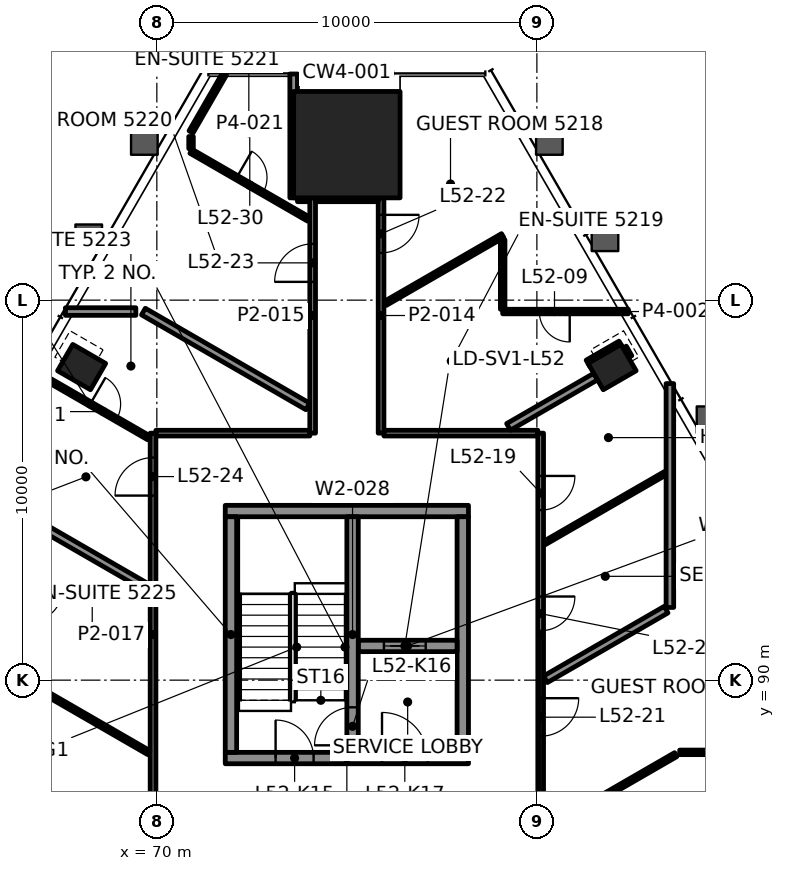
"""IFC4 building model, lengths in metres.
Left out: names, types, materials, properties, quantities, classifications, styles, units other than length and angle.
Written with IfcOpenShell. Run it as: python <this file> out.ifc"""

import sys

from ifc_helpers import new_model, si_unit, direction, frame, frame_2d, origin, origin_2d, place, context, subcontext, project, spatial, rectangle, hollow_rectangle, extrude, element, fill, save


model = new_model("IFC4")
c1 = context("Model", 3, precision=1e-05, world=origin(), true_north=direction((0.0, 1.0)))
c2 = subcontext(c1, "Body", "Model", "MODEL_VIEW")
j1 = project(units=[si_unit("LENGTHUNIT", "METRE"), si_unit("PLANEANGLEUNIT", "RADIAN")], contexts=[c1])
p1 = place(None, origin())
s1 = spatial("IfcSite", under=j1, at=p1, CompositionType="ELEMENT")
p2 = place(p1, origin())
s2 = spatial("IfcBuilding", under=s1, at=p2, CompositionType="ELEMENT")
p3 = place(p2, frame((0.0, 0.0, 222.1)))
s3 = spatial("IfcBuildingStorey", under=s2, at=p3, CompositionType="ELEMENT", Elevation=222.1)
p4 = place(p3, frame((75.0, 104.092, 0.0), z_axis=(0.0, 0.0, 1.0), x_axis=(-1.0, 0.0, 0.0)))
e1 = element("IfcColumn", 1, at=p4, inside=s3, PredefinedType="COLUMN", context=c2, shape_type="SweptSolid", body=[
    extrude(rectangle(XDim=2.8, YDim=2.8, at=origin_2d()), origin(), (0.0, 0.0, 1.0), 3.9),
])
for number, where, z_axis, x_axis in (
    (2, (81.979, 98.238, -0.0), (0.0, 0.0, 1.0), (-0.5, 0.866, 0.0)),
    (3, (68.021, 98.238, -0.0), (0.0, 0.0, 1.0), (-0.5, -0.866, 0.0)),
):
    element("IfcColumn", number, at=place(p3, frame(where, z_axis=z_axis, x_axis=x_axis)), inside=s3, PredefinedType="COLUMN", context=c2, shape_type="SweptSolid", body=[
        extrude(hollow_rectangle(XDim=0.8, YDim=1.0, WallThickness=0.05, at=origin_2d()), origin(), (0.0, 0.0, 1.0), 3.9),
    ])
p5 = place(p3, frame((71.8, 87.95, 0.0), z_axis=(0.0, 0.0, 1.0), x_axis=(1.0, 0.0, 0.0)))
e4 = element("IfcWall", 4, at=p5, inside=s3, PredefinedType="SHEAR", context=c2, shape_type="SweptSolid", body=[
    extrude(rectangle(XDim=6.4, YDim=0.3, at=frame_2d((3.2, 0.0))), origin(), (0.0, 0.0, 1.0), 3.7),
])
p6 = place(p5, frame((1.325, 0.0, 0.0)))
e5 = element("IfcOpeningElement", 5, at=p6, cuts=e4, PredefinedType="OPENING", context=c2, shape_type="SweptSolid", body=[
    extrude(rectangle(XDim=1.0, YDim=2.1, at=frame_2d((0.5, 1.05))), frame((0.0, 0.16, 0.0), z_axis=(0.0, -1.0, 0.0), x_axis=(1.0, 0.0, 0.0)), (0.0, 0.0, 1.0), 0.32),
])
p7 = place(p5, frame((4.125, 0.0, 0.0)))
e6 = element("IfcOpeningElement", 6, at=p7, cuts=e4, PredefinedType="OPENING", context=c2, shape_type="SweptSolid", body=[
    extrude(rectangle(XDim=1.2, YDim=2.1, at=frame_2d((0.6, 1.05))), frame((0.0, 0.16, 0.0), z_axis=(0.0, -1.0, 0.0), x_axis=(1.0, 0.0, 0.0)), (0.0, 0.0, 1.0), 0.32),
])
p8 = place(p3, frame((71.8, 94.45, 0.0), z_axis=(0.0, 0.0, 1.0), x_axis=(1.0, 0.0, 0.0)))
e7 = element("IfcWall", 7, at=p8, inside=s3, PredefinedType="SHEAR", context=c2, shape_type="SweptSolid", body=[
    extrude(rectangle(XDim=6.4, YDim=0.3, at=frame_2d((3.2, 0.0))), origin(), (0.0, 0.0, 1.0), 3.7),
])
for number, where, z_axis, x_axis in (
    (8, (71.95, 88.1, 0.0), (0.0, 0.0, 1.0), (0.0, 1.0, 0.0)),
    (9, (78.05, 88.1, 0.0), (0.0, 0.0, 1.0), (0.0, 1.0, 0.0)),
):
    element("IfcWall", number, at=place(p3, frame(where, z_axis=z_axis, x_axis=x_axis)), inside=s3, PredefinedType="SHEAR", context=c2, shape_type="SweptSolid", body=[
        extrude(rectangle(XDim=6.2, YDim=0.3, at=frame_2d((3.1, 0.0))), origin(), (0.0, 0.0, 1.0), 3.7),
    ])
p9 = place(p3, frame((75.3, 90.9, 0.0), z_axis=(0.0, 0.0, 1.0), x_axis=(1.0, 0.0, 0.0)))
e10 = element("IfcWall", 10, at=p9, inside=s3, PredefinedType="SHEAR", context=c2, shape_type="SweptSolid", body=[
    extrude(rectangle(XDim=2.6, YDim=0.3, at=frame_2d((1.3, 0.0))), origin(), (0.0, 0.0, 1.0), 3.7),
])
p10 = place(p9, frame((0.675, 0.0, 0.0)))
e11 = element("IfcOpeningElement", 11, at=p10, cuts=e10, PredefinedType="OPENING", context=c2, shape_type="SweptSolid", body=[
    extrude(rectangle(XDim=1.1, YDim=2.1, at=frame_2d((0.55, 1.05))), frame((0.0, 0.16, 0.0), z_axis=(0.0, -1.0, 0.0), x_axis=(1.0, 0.0, 0.0)), (0.0, 0.0, 1.0), 0.32),
])
p11 = place(p3, frame((75.15, 88.1, 0.0), z_axis=(0.0, 0.0, 1.0), x_axis=(0.0, 1.0, 0.0)))
e12 = element("IfcWall", 12, at=p11, inside=s3, PredefinedType="SHEAR", context=c2, shape_type="SweptSolid", body=[
    extrude(rectangle(XDim=6.2, YDim=0.3, at=frame_2d((3.1, 0.0))), origin(), (0.0, 0.0, 1.0), 3.7),
])
p12 = place(p11, frame((0.185, 0.0, 0.0)))
e13 = element("IfcOpeningElement", 13, at=p12, cuts=e12, PredefinedType="OPENING", context=c2, shape_type="SweptSolid", body=[
    extrude(rectangle(XDim=1.0, YDim=2.1, at=frame_2d((0.5, 1.05))), frame((0.0, 0.16, 0.0), z_axis=(0.0, -1.0, 0.0), x_axis=(1.0, 0.0, 0.0)), (0.0, 0.0, 1.0), 0.32),
])
p13 = place(p3, frame((88.941, 88.1, 0.0), z_axis=(0.0, 0.0, 1.0), x_axis=(-1.0, 0.0, 0.0)))
e14 = element("IfcWall", 14, at=p13, inside=s3, PredefinedType="PARTITIONING", context=c2, shape_type="SweptSolid", body=[
    extrude(rectangle(XDim=5.183, YDim=0.12, at=frame_2d((2.592, 0.0))), origin(), (0.0, 0.0, 1.0), 3.022),
])
p14 = place(p13, frame((2.399, 0.0, 0.0)))
e15 = element("IfcOpeningElement", 15, at=p14, cuts=e14, PredefinedType="OPENING", context=c2, shape_type="SweptSolid", body=[
    extrude(rectangle(XDim=0.8, YDim=2.1, at=frame_2d((0.4, 1.05))), frame((0.0, 0.07, 0.0), z_axis=(0.0, -1.0, 0.0), x_axis=(1.0, 0.0, 0.0)), (0.0, 0.0, 1.0), 0.14),
])
for number, where, z_axis, x_axis in (
    (16, (69.976, 96.5, 0.0), (0.0, 0.0, 1.0), (1.0, 0.0, 0.0)),
    (17, (75.975, 96.5, 0.0), (0.0, 0.0, 1.0), (1.0, 0.0, 0.0)),
):
    element("IfcWall", number, at=place(p3, frame(where, z_axis=z_axis, x_axis=x_axis)), inside=s3, PredefinedType="PARTITIONING", context=c2, shape_type="SweptSolid", body=[
        extrude(rectangle(XDim=4.049, YDim=0.15, at=frame_2d((2.025, 0.0))), origin(), (0.0, 0.0, 1.0), 3.1),
    ])
p15 = place(p3, frame((67.594, 99.7, 0.0), z_axis=(0.0, 0.0, 1.0), x_axis=(1.0, 0.0, 0.0)))
e18 = element("IfcWall", 18, at=p15, inside=s3, PredefinedType="PARTITIONING", context=c2, shape_type="SweptSolid", body=[
    extrude(rectangle(XDim=1.853, YDim=0.2, at=frame_2d((0.927, 0.0))), origin(), (0.0, 0.0, 1.0), 3.1),
])
p16 = place(p3, frame((82.406, 99.7, 0.0), z_axis=(0.0, 0.0, 1.0), x_axis=(-1.0, 0.0, 0.0)))
e19 = element("IfcWall", 19, at=p16, inside=s3, PredefinedType="PARTITIONING", context=c2, shape_type="SweptSolid", body=[
    extrude(rectangle(XDim=3.305, YDim=0.12, at=frame_2d((1.653, 0.0))), origin(), (0.0, 0.0, 1.0), 3.1),
])
p17 = place(p16, frame((1.542, 0.0, 0.0)))
e20 = element("IfcOpeningElement", 20, at=p17, cuts=e19, PredefinedType="OPENING", context=c2, shape_type="SweptSolid", body=[
    extrude(rectangle(XDim=0.8, YDim=2.1, at=frame_2d((0.4, 1.05))), frame((0.0, 0.07, 0.0), z_axis=(0.0, -1.0, 0.0), x_axis=(1.0, 0.0, 0.0)), (0.0, 0.0, 1.0), 0.14),
])
p18 = place(p3, frame((73.7, 102.691, 0.0), z_axis=(0.0, 0.0, 1.0), x_axis=(1.0, 0.0, 0.0)))
e21 = element("IfcWall", 21, at=p18, inside=s3, PredefinedType="PARTITIONING", context=c2, shape_type="SweptSolid", body=[
    extrude(rectangle(XDim=0.324, YDim=0.2, at=frame_2d((0.162, 0.0))), origin(), (0.0, 0.0, 1.0), 3.1),
])
p19 = place(p3, frame((84.115, 85.065, 0.0), z_axis=(0.0, 0.0, 1.0), x_axis=(0.866027152591, 0.499996970966, 0.0)))
e22 = element("IfcWall", 22, at=p19, inside=s3, PredefinedType="PARTITIONING", context=c2, shape_type="SweptSolid", body=[
    extrude(rectangle(XDim=5.697, YDim=0.2, at=frame_2d((2.848, 0.0))), origin(), (0.0, 0.0, 1.0), 3.022),
])
p20 = place(p3, frame((80.209, 86.052, 0.0), z_axis=(0.0, 0.0, 1.0), x_axis=(0.866032250876, 0.499988140302, 0.0)))
e23 = element("IfcWall", 23, at=p20, inside=s3, PredefinedType="PARTITIONING", context=c2, shape_type="SweptSolid", body=[
    extrude(rectangle(XDim=3.977, YDim=0.12, at=frame_2d((1.989, 0.0))), origin(), (0.0, 0.0, 1.0), 3.1),
])
p21 = place(p3, frame((80.227, 90.023, 0.0), z_axis=(0.0, 0.0, 1.0), x_axis=(0.866020252061, 0.500008922941, 0.0)))
e24 = element("IfcWall", 24, at=p21, inside=s3, PredefinedType="PARTITIONING", context=c2, shape_type="SweptSolid", body=[
    extrude(rectangle(XDim=3.664, YDim=0.2, at=frame_2d((1.832, 0.0))), origin(), (0.0, 0.0, 1.0), 3.1),
])
p22 = place(p3, frame((80.201, 93.61, 0.0), z_axis=(0.0, 0.0, 1.0), x_axis=(0.866020252061, 0.500008922941, 0.0)))
e25 = element("IfcWall", 25, at=p22, inside=s3, PredefinedType="PARTITIONING", context=c2, shape_type="SweptSolid", body=[
    extrude(rectangle(XDim=3.664, YDim=0.1, at=frame_2d((1.832, 0.0))), origin(), (0.0, 0.0, 1.0), 3.1),
])
p23 = place(p3, frame((79.255, 96.665, 0.0), z_axis=(0.0, 0.0, 1.0), x_axis=(0.866048852527, 0.499959383386, 0.0)))
e26 = element("IfcWall", 26, at=p23, inside=s3, PredefinedType="PARTITIONING", context=c2, shape_type="SweptSolid", body=[
    extrude(rectangle(XDim=2.646, YDim=0.2, at=frame_2d((1.323, 0.0))), origin(), (0.0, 0.0, 1.0), 3.1),
])
p24 = place(p3, frame((81.346, 98.334, 0.0), z_axis=(0.0, 0.0, 1.0), x_axis=(0.866010750942, 0.50002537861, 0.0)))
e27 = element("IfcWall", 27, at=p24, inside=s3, PredefinedType="PARTITIONING", context=c2, shape_type="SweptSolid", body=[
    extrude(rectangle(XDim=1.0, YDim=0.2, at=frame_2d((0.5, 0.0))), origin(), (0.0, 0.0, 1.0), 3.1),
])
p25 = place(p3, frame((76.01, 99.914, 0.0), z_axis=(0.0, 0.0, 1.0), x_axis=(0.866028357664, 0.499994883695, 0.0)))
e28 = element("IfcWall", 28, at=p25, inside=s3, PredefinedType="PARTITIONING", context=c2, shape_type="SweptSolid", body=[
    extrude(rectangle(XDim=3.568, YDim=0.12, at=frame_2d((1.784, 0.0))), origin(), (0.0, 0.0, 1.0), 3.1),
])
p26 = place(p3, frame((70.9, 104.426, 0.0), z_axis=(0.0, 0.0, 1.0), x_axis=(0.500014360914, 0.866017112348, 0.0)))
e29 = element("IfcWall", 29, at=p26, inside=s3, PredefinedType="PARTITIONING", context=c2, shape_type="SweptSolid", body=[
    extrude(rectangle(XDim=1.762, YDim=0.12, at=frame_2d((0.881, 0.0))), origin(), (0.0, 0.0, 1.0), 3.1),
])
p27 = place(p3, frame((83.5, 91.913, 0.0), z_axis=(0.0, 0.0, 1.0), x_axis=(0.0, 1.0, 0.0)))
e30 = element("IfcWall", 30, at=p27, inside=s3, PredefinedType="PARTITIONING", context=c2, shape_type="SweptSolid", body=[
    extrude(rectangle(XDim=5.892, YDim=0.2, at=frame_2d((2.946, 0.0))), origin(), (0.0, 0.0, 1.0), 3.022),
])
p28 = place(p3, frame((80.1, 96.5, 0.0), z_axis=(0.0, 0.0, 1.0), x_axis=(0.0, -1.0, 0.0)))
e31 = element("IfcWall", 31, at=p28, inside=s3, PredefinedType="PARTITIONING", context=c2, shape_type="SweptSolid", body=[
    extrude(rectangle(XDim=10.6, YDim=0.15, at=frame_2d((5.3, 0.0))), origin(), (0.0, 0.0, 1.0), 3.1),
])
p29 = place(p28, frame((1.125, 0.0, 0.0)))
e32 = element("IfcOpeningElement", 32, at=p29, cuts=e31, PredefinedType="OPENING", context=c2, shape_type="SweptSolid", body=[
    extrude(rectangle(XDim=0.9, YDim=2.1, at=frame_2d((0.45, 1.05))), frame((0.0, 0.085, 0.0), z_axis=(0.0, -1.0, 0.0), x_axis=(1.0, 0.0, 0.0)), (0.0, 0.0, 1.0), 0.17),
])
p30 = place(p28, frame((4.299, 0.0, 0.0)))
e33 = element("IfcOpeningElement", 33, at=p30, cuts=e31, PredefinedType="OPENING", context=c2, shape_type="SweptSolid", body=[
    extrude(rectangle(XDim=0.9, YDim=2.1, at=frame_2d((0.45, 1.05))), frame((0.0, 0.085, 0.0), z_axis=(0.0, -1.0, 0.0), x_axis=(1.0, 0.0, 0.0)), (0.0, 0.0, 1.0), 0.17),
])
p31 = place(p28, frame((6.974, 0.0, 0.0)))
e34 = element("IfcOpeningElement", 34, at=p31, cuts=e31, PredefinedType="OPENING", context=c2, shape_type="SweptSolid", body=[
    extrude(rectangle(XDim=1.0, YDim=2.1, at=frame_2d((0.5, 1.05))), frame((0.0, 0.085, 0.0), z_axis=(0.0, -1.0, 0.0), x_axis=(1.0, 0.0, 0.0)), (0.0, 0.0, 1.0), 0.17),
])
p32 = place(p3, frame((79.1, 99.76, 0.0), z_axis=(0.0, 0.0, 1.0), x_axis=(0.0, 1.0, 0.0)))
e35 = element("IfcWall", 35, at=p32, inside=s3, PredefinedType="PARTITIONING", context=c2, shape_type="SweptSolid", body=[
    extrude(rectangle(XDim=1.829, YDim=0.12, at=frame_2d((0.915, 0.0))), origin(), (0.0, 0.0, 1.0), 3.1),
])
p33 = place(p3, frame((75.9, 102.691, 0.0), z_axis=(0.0, 0.0, 1.0), x_axis=(0.0, -1.0, 0.0)))
e36 = element("IfcWall", 36, at=p33, inside=s3, PredefinedType="PARTITIONING", context=c2, shape_type="SweptSolid", body=[
    extrude(rectangle(XDim=6.191, YDim=0.15, at=frame_2d((3.095, 0.0))), origin(), (0.0, 0.0, 1.0), 3.1),
])
p34 = place(p33, frame((0.447, 0.0, 0.0)))
e37 = element("IfcOpeningElement", 37, at=p34, cuts=e36, PredefinedType="OPENING", context=c2, shape_type="SweptSolid", body=[
    extrude(rectangle(XDim=1.0, YDim=2.1, at=frame_2d((0.5, 1.05))), frame((0.0, 0.085, 0.0), z_axis=(0.0, -1.0, 0.0), x_axis=(1.0, 0.0, 0.0)), (0.0, 0.0, 1.0), 0.17),
])
p35 = place(p3, frame((74.1, 96.5, 0.0), z_axis=(0.0, 0.0, 1.0), x_axis=(0.0, 1.0, 0.0)))
e38 = element("IfcWall", 38, at=p35, inside=s3, PredefinedType="PARTITIONING", context=c2, shape_type="SweptSolid", body=[
    extrude(rectangle(XDim=6.191, YDim=0.15, at=frame_2d((3.096, 0.0))), origin(), (0.0, 0.0, 1.0), 3.1),
])
p36 = place(p35, frame((3.981, 0.0, 0.0)))
e39 = element("IfcOpeningElement", 39, at=p36, cuts=e38, PredefinedType="OPENING", context=c2, shape_type="SweptSolid", body=[
    extrude(rectangle(XDim=1.0, YDim=2.1, at=frame_2d((0.5, 1.05))), frame((0.0, 0.085, 0.0), z_axis=(0.0, -1.0, 0.0), x_axis=(1.0, 0.0, 0.0)), (0.0, 0.0, 1.0), 0.17),
])
p37 = place(p3, frame((73.6, 102.692, 0.0), z_axis=(0.0, 0.0, 1.0), x_axis=(0.0, 1.0, 0.0)))
e40 = element("IfcWall", 40, at=p37, inside=s3, PredefinedType="PARTITIONING", context=c2, shape_type="SweptSolid", body=[
    extrude(rectangle(XDim=3.26, YDim=0.2, at=frame_2d((1.63, 0.0))), origin(), (0.0, 0.0, 1.0), 3.1),
])
p38 = place(p3, frame((70.9, 103.986, 0.0), z_axis=(0.0, 0.0, 1.0), x_axis=(0.0, 1.0, 0.0)))
e41 = element("IfcWall", 41, at=p38, inside=s3, PredefinedType="PARTITIONING", context=c2, shape_type="SweptSolid", body=[
    extrude(rectangle(XDim=0.319, YDim=0.12, at=frame_2d((0.16, 0.0))), origin(), (0.0, 0.0, 1.0), 3.1),
])
p39 = place(p3, frame((69.9, 85.9, 0.0), z_axis=(0.0, 0.0, 1.0), x_axis=(0.0, 1.0, 0.0)))
e42 = element("IfcWall", 42, at=p39, inside=s3, PredefinedType="PARTITIONING", context=c2, shape_type="SweptSolid", body=[
    extrude(rectangle(XDim=10.599, YDim=0.15, at=frame_2d((5.3, 0.0))), origin(), (0.0, 0.0, 1.0), 3.1),
])
p40 = place(p39, frame((8.956, 0.0, 0.0)))
e43 = element("IfcOpeningElement", 43, at=p40, cuts=e42, PredefinedType="OPENING", context=c2, shape_type="SweptSolid", body=[
    extrude(rectangle(XDim=1.0, YDim=2.1, at=frame_2d((0.5, 1.05))), frame((0.0, 0.085, 0.0), z_axis=(0.0, -1.0, 0.0), x_axis=(1.0, 0.0, 0.0)), (0.0, 0.0, 1.0), 0.17),
])
p41 = place(p3, frame((82.412, 98.488, 0.0), z_axis=(0.0, 0.0, 1.0), x_axis=(-0.499941024108, 0.866059450854, 0.0)))
e44 = element("IfcWall", 44, at=p41, inside=s3, PredefinedType="PARTITIONING", context=c2, shape_type="SweptSolid", body=[
    extrude(rectangle(XDim=0.29, YDim=0.2, at=frame_2d((0.145, 0.0))), origin(), (0.0, 0.0, 1.0), 3.1),
])
p42 = place(p3, frame((70.9, 103.917, 0.0), z_axis=(0.0, 0.0, 1.0), x_axis=(0.866028357664, -0.499994883695, 0.0)))
e45 = element("IfcWall", 45, at=p42, inside=s3, PredefinedType="PARTITIONING", context=c2, shape_type="SweptSolid", body=[
    extrude(rectangle(XDim=3.568, YDim=0.12, at=frame_2d((1.784, 0.0))), origin(), (0.0, 0.0, 1.0), 3.1),
])
p43 = place(p42, frame((1.384, 0.0, 0.0)))
e46 = element("IfcOpeningElement", 46, at=p43, cuts=e45, PredefinedType="OPENING", context=c2, shape_type="SweptSolid", body=[
    extrude(rectangle(XDim=0.8, YDim=2.1, at=frame_2d((0.4, 1.05))), frame((0.0, 0.07, 0.0), z_axis=(0.0, -1.0, 0.0), x_axis=(1.0, 0.0, 0.0)), (0.0, 0.0, 1.0), 0.14),
])
p44 = place(p3, frame((73.973, 97.202, 0.0), z_axis=(0.0, 0.0, 1.0), x_axis=(-0.866035818332, 0.499981961041, 0.0)))
e47 = element("IfcWall", 47, at=p44, inside=s3, PredefinedType="PARTITIONING", context=c2, shape_type="SweptSolid", body=[
    extrude(rectangle(XDim=4.995, YDim=0.2, at=frame_2d((2.498, 0.0))), origin(), (0.0, 0.0, 1.0), 3.1),
])
p45 = place(p3, frame((66.704, 98.158, 0.0), z_axis=(0.0, 0.0, 1.0), x_axis=(0.866021313335, -0.500007084799, 0.0)))
e48 = element("IfcWall", 48, at=p45, inside=s3, PredefinedType="PARTITIONING", context=c2, shape_type="SweptSolid", body=[
    extrude(rectangle(XDim=3.564, YDim=0.12, at=frame_2d((1.782, 0.0))), origin(), (0.0, 0.0, 1.0), 3.022),
])
p46 = place(p45, frame((1.782, 0.0, 0.0)))
e49 = element("IfcOpeningElement", 49, at=p46, cuts=e48, PredefinedType="OPENING", context=c2, shape_type="SweptSolid", body=[
    extrude(rectangle(XDim=0.8, YDim=2.1, at=frame_2d((0.4, 1.05))), frame((0.0, 0.07, 0.0), z_axis=(0.0, -1.0, 0.0), x_axis=(1.0, 0.0, 0.0)), (0.0, 0.0, 1.0), 0.14),
])
p47 = place(p3, frame((69.773, 92.424, 0.0), z_axis=(0.0, 0.0, 1.0), x_axis=(-0.866031780221, 0.499988955525, 0.0)))
e50 = element("IfcWall", 50, at=p47, inside=s3, PredefinedType="PARTITIONING", context=c2, shape_type="SweptSolid", body=[
    extrude(rectangle(XDim=5.524, YDim=0.2, at=frame_2d((2.762, 0.0))), origin(), (0.0, 0.0, 1.0), 3.022),
])
p48 = place(p3, frame((69.79, 88.092, 0.0), z_axis=(0.0, 0.0, 1.0), x_axis=(-0.866045006744, 0.49996604514, 0.0)))
e51 = element("IfcWall", 51, at=p48, inside=s3, PredefinedType="PARTITIONING", context=c2, shape_type="SweptSolid", body=[
    extrude(rectangle(XDim=3.499, YDim=0.12, at=frame_2d((1.75, 0.0))), origin(), (0.0, 0.0, 1.0), 3.1),
])
p49 = place(p3, frame((74.175, 102.691, 0.0), z_axis=(0.0, 0.0, 1.0), x_axis=(1.0, 0.0, 0.0)))
e52 = element("IfcWall", 52, at=p49, inside=s3, PredefinedType="PARTITIONING", context=c2, shape_type="SweptSolid", body=[
    extrude(rectangle(XDim=1.649, YDim=0.2, at=frame_2d((0.825, 0.0))), origin(), (0.0, 0.0, 1.0), 3.097),
])
p50 = place(p17, origin())
e53 = element("IfcDoor", 53, at=p50, inside=s3, OperationType="SINGLE_SWING_LEFT", PredefinedType="DOOR", context=c2, shape_type="SweptSolid", body=[
    extrude(rectangle(XDim=0.8, YDim=2.1, at=frame_2d((0.4, 1.05))), frame((0.0, 0.025, 0.0), z_axis=(0.0, -1.0, 0.0), x_axis=(1.0, 0.0, 0.0)), (0.0, 0.0, 1.0), 0.05),
])
fill(e20, e53)
p51 = place(p29, origin())
e54 = element("IfcDoor", 54, at=p51, inside=s3, OperationType="SINGLE_SWING_LEFT", PredefinedType="DOOR", context=c2, shape_type="SweptSolid", body=[
    extrude(rectangle(XDim=0.9, YDim=2.1, at=frame_2d((0.45, 1.05))), frame((0.0, 0.025, 0.0), z_axis=(0.0, -1.0, 0.0), x_axis=(1.0, 0.0, 0.0)), (0.0, 0.0, 1.0), 0.05),
])
fill(e32, e54)
p52 = place(p30, origin())
e55 = element("IfcDoor", 55, at=p52, inside=s3, OperationType="SINGLE_SWING_RIGHT", PredefinedType="DOOR", context=c2, shape_type="SweptSolid", body=[
    extrude(rectangle(XDim=0.9, YDim=2.1, at=frame_2d((0.45, 1.05))), frame((0.0, 0.025, 0.0), z_axis=(0.0, -1.0, 0.0), x_axis=(1.0, 0.0, 0.0)), (0.0, 0.0, 1.0), 0.05),
])
fill(e33, e55)
p53 = place(p31, origin())
e56 = element("IfcDoor", 56, at=p53, inside=s3, OperationType="SINGLE_SWING_RIGHT", PredefinedType="DOOR", context=c2, shape_type="SweptSolid", body=[
    extrude(rectangle(XDim=1.0, YDim=2.1, at=frame_2d((0.5, 1.05))), frame((0.0, 0.025, 0.0), z_axis=(0.0, -1.0, 0.0), x_axis=(1.0, 0.0, 0.0)), (0.0, 0.0, 1.0), 0.05),
])
fill(e34, e56)
p54 = place(p34, origin())
e57 = element("IfcDoor", 57, at=p54, inside=s3, OperationType="SINGLE_SWING_RIGHT", PredefinedType="DOOR", context=c2, shape_type="SweptSolid", body=[
    extrude(rectangle(XDim=1.0, YDim=2.1, at=frame_2d((0.5, 1.05))), frame((0.0, 0.025, 0.0), z_axis=(0.0, -1.0, 0.0), x_axis=(1.0, 0.0, 0.0)), (0.0, 0.0, 1.0), 0.05),
])
fill(e37, e57)
p55 = place(p36, origin())
e58 = element("IfcDoor", 58, at=p55, inside=s3, OperationType="SINGLE_SWING_LEFT", PredefinedType="DOOR", context=c2, shape_type="SweptSolid", body=[
    extrude(rectangle(XDim=1.0, YDim=2.1, at=frame_2d((0.5, 1.05))), frame((0.0, 0.025, 0.0), z_axis=(0.0, -1.0, 0.0), x_axis=(1.0, 0.0, 0.0)), (0.0, 0.0, 1.0), 0.05),
])
fill(e39, e58)
p56 = place(p40, origin())
e59 = element("IfcDoor", 59, at=p56, inside=s3, OperationType="SINGLE_SWING_LEFT", PredefinedType="DOOR", context=c2, shape_type="SweptSolid", body=[
    extrude(rectangle(XDim=1.0, YDim=2.1, at=frame_2d((0.5, 1.05))), frame((0.0, 0.025, 0.0), z_axis=(0.0, -1.0, 0.0), x_axis=(1.0, 0.0, 0.0)), (0.0, 0.0, 1.0), 0.05),
])
fill(e43, e59)
p57 = place(p43, origin())
e60 = element("IfcDoor", 60, at=p57, inside=s3, OperationType="SINGLE_SWING_LEFT", PredefinedType="DOOR", context=c2, shape_type="SweptSolid", body=[
    extrude(rectangle(XDim=0.8, YDim=2.1, at=frame_2d((0.4, 1.05))), frame((0.0, 0.025, 0.0), z_axis=(0.0, -1.0, 0.0), x_axis=(1.0, 0.0, 0.0)), (0.0, 0.0, 1.0), 0.05),
])
fill(e46, e60)
p58 = place(p46, origin())
e61 = element("IfcDoor", 61, at=p58, inside=s3, OperationType="SINGLE_SWING_LEFT", PredefinedType="DOOR", context=c2, shape_type="SweptSolid", body=[
    extrude(rectangle(XDim=0.8, YDim=2.1, at=frame_2d((0.4, 1.05))), frame((0.0, 0.025, 0.0), z_axis=(0.0, -1.0, 0.0), x_axis=(1.0, 0.0, 0.0)), (0.0, 0.0, 1.0), 0.05),
])
fill(e49, e61)
p59 = place(p10, origin())
e62 = element("IfcDoor", 62, at=p59, inside=s3, OperationType="DOUBLE_DOOR_SLIDING", PredefinedType="DOOR", context=c2, shape_type="SweptSolid", body=[
    extrude(rectangle(XDim=1.1, YDim=2.1, at=frame_2d((0.55, 1.05))), frame((0.0, 0.025, 0.0), z_axis=(0.0, -1.0, 0.0), x_axis=(1.0, 0.0, 0.0)), (0.0, 0.0, 1.0), 0.05),
])
fill(e11, e62)
p60 = place(p6, origin())
e63 = element("IfcDoor", 63, at=p60, inside=s3, OperationType="SINGLE_SWING_RIGHT", PredefinedType="DOOR", context=c2, shape_type="SweptSolid", body=[
    extrude(rectangle(XDim=1.0, YDim=2.1, at=frame_2d((0.5, 1.05))), frame((0.0, 0.025, 0.0), z_axis=(0.0, -1.0, 0.0), x_axis=(1.0, 0.0, 0.0)), (0.0, 0.0, 1.0), 0.05),
])
fill(e5, e63)
p61 = place(p12, origin())
e64 = element("IfcDoor", 64, at=p61, inside=s3, OperationType="SINGLE_SWING_LEFT", PredefinedType="DOOR", context=c2, shape_type="SweptSolid", body=[
    extrude(rectangle(XDim=1.0, YDim=2.1, at=frame_2d((0.5, 1.05))), frame((0.0, 0.025, 0.0), z_axis=(0.0, -1.0, 0.0), x_axis=(1.0, 0.0, 0.0)), (0.0, 0.0, 1.0), 0.05),
])
fill(e13, e64)
p62 = place(p7, origin())
e65 = element("IfcDoor", 65, at=p62, inside=s3, OperationType="SINGLE_SWING_RIGHT", PredefinedType="DOOR", context=c2, shape_type="SweptSolid", body=[
    extrude(rectangle(XDim=1.2, YDim=2.1, at=frame_2d((0.6, 1.05))), frame((0.0, 0.025, 0.0), z_axis=(0.0, -1.0, 0.0), x_axis=(1.0, 0.0, 0.0)), (0.0, 0.0, 1.0), 0.05),
])
fill(e6, e65)
save(model, sys.argv[1])
